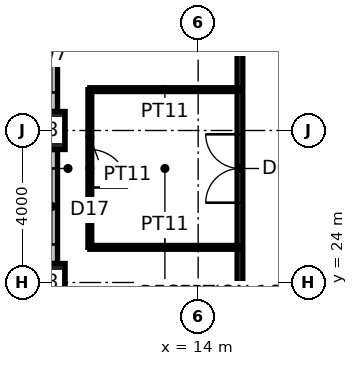
"""IFC4 building model, lengths in metres.
Left out: names, types, materials, properties, quantities, classifications, styles, units other than length and angle.
Written with IfcOpenShell. Run it as: python <this file> out.ifc"""

import sys

from ifc_helpers import new_model, si_unit, direction, frame, frame_2d, origin, origin_2d, place, context, subcontext, project, spatial, rectangle, hollow_rectangle, extrude, element, fill, save


model = new_model("IFC4")
c1 = context("Model", 3, precision=1e-05, world=origin(), true_north=direction((0.0, 1.0)))
c2 = subcontext(c1, "Body", "Model", "MODEL_VIEW")
j1 = project(units=[si_unit("LENGTHUNIT", "METRE"), si_unit("PLANEANGLEUNIT", "RADIAN")], contexts=[c1])
p1 = place(None, origin())
s1 = spatial("IfcSite", under=j1, at=p1, CompositionType="ELEMENT")
p2 = place(p1, origin())
s2 = spatial("IfcBuilding", under=s1, at=p2, CompositionType="ELEMENT")
p3 = place(p2, frame((0.0, 0.0, 133.4)))
s3 = spatial("IfcBuildingStorey", under=s2, at=p3, CompositionType="ELEMENT", Elevation=133.4)
for number, where, z_axis, x_axis in (
    (1, (10.0, 24.0, 0.0), (0.0, 0.0, 1.0), (1.0, 0.0, 0.0)),
    (2, (10.0, 28.0, 0.0), (0.0, 0.0, 1.0), (1.0, 0.0, 0.0)),
):
    element("IfcColumn", number, at=place(p3, frame(where, z_axis=z_axis, x_axis=x_axis)), inside=s3, PredefinedType="COLUMN", context=c2, shape_type="SweptSolid", body=[
        extrude(hollow_rectangle(XDim=1.0, YDim=1.0, WallThickness=0.125, at=origin_2d()), origin(), (0.0, 0.0, 1.0), 4.0),
    ])
p4 = place(p3, frame((15.1, 15.625, 0.0), z_axis=(0.0, 0.0, 1.0), x_axis=(0.0, 1.0, 0.0)))
e3 = element("IfcWall", 3, at=p4, inside=s3, PredefinedType="PARTITIONING", context=c2, shape_type="SweptSolid", body=[
    extrude(rectangle(XDim=22.75, YDim=0.15, at=frame_2d((11.375, 0.0))), origin(), (0.0, 0.0, 1.0), 3.85),
])
p5 = place(p4, frame((10.475, 0.0, 0.0)))
e4 = element("IfcOpeningElement", 4, at=p5, cuts=e3, PredefinedType="OPENING", context=c2, shape_type="SweptSolid", body=[
    extrude(rectangle(XDim=1.8, YDim=2.4, at=frame_2d((0.9, 1.2))), frame((0.0, 0.085, 0.0), z_axis=(0.0, -1.0, 0.0), x_axis=(1.0, 0.0, 0.0)), (0.0, 0.0, 1.0), 0.17),
])
p6 = place(p3, frame((15.1, 29.075, 0.0), z_axis=(0.0, 0.0, 1.0), x_axis=(-1.0, 0.0, 0.0)))
e5 = element("IfcWall", 5, at=p6, inside=s3, PredefinedType="PARTITIONING", context=c2, shape_type="SweptSolid", body=[
    extrude(rectangle(XDim=3.95, YDim=0.1, at=frame_2d((1.975, 0.0))), origin(), (0.0, 0.0, 1.0), 3.85),
])
p7 = place(p3, frame((11.15, 29.075, 0.0), z_axis=(0.0, 0.0, 1.0), x_axis=(0.0, -1.0, 0.0)))
e6 = element("IfcWall", 6, at=p7, inside=s3, PredefinedType="PARTITIONING", context=c2, shape_type="SweptSolid", body=[
    extrude(rectangle(XDim=4.15, YDim=0.1, at=frame_2d((2.075, 0.0))), origin(), (0.0, 0.0, 1.0), 3.85),
])
p8 = place(p7, frame((1.575, 0.0, 0.0)))
e7 = element("IfcOpeningElement", 7, at=p8, cuts=e6, PredefinedType="OPENING", context=c2, shape_type="SweptSolid", body=[
    extrude(rectangle(XDim=1.0, YDim=2.2, at=frame_2d((0.5, 1.1))), frame((0.0, 0.06, 0.0), z_axis=(0.0, -1.0, 0.0), x_axis=(1.0, 0.0, 0.0)), (0.0, 0.0, 1.0), 0.12),
])
p9 = place(p3, frame((11.15, 24.925, 0.0), z_axis=(0.0, 0.0, 1.0), x_axis=(1.0, 0.0, 0.0)))
e8 = element("IfcWall", 8, at=p9, inside=s3, PredefinedType="PARTITIONING", context=c2, shape_type="SweptSolid", body=[
    extrude(rectangle(XDim=3.95, YDim=0.1, at=frame_2d((1.975, 0.0))), origin(), (0.0, 0.0, 1.0), 3.85),
])
p10 = place(p3, frame((10.15, 27.5, 0.0), z_axis=(0.0, 0.0, 1.0), x_axis=(0.0, -1.0, 0.0)))
e9 = element("IfcWall", 9, at=p10, inside=s3, PredefinedType="ELEMENTEDWALL", context=c2, shape_type="SweptSolid", body=[
    extrude(rectangle(XDim=3.0, YDim=0.3, at=frame_2d((1.5, 0.0))), origin(), (0.0, 0.0, 1.0), 2.65),
])
p11 = place(p10, frame((0.5, 0.0, 0.8)))
e10 = element("IfcOpeningElement", 10, at=p11, cuts=e9, PredefinedType="OPENING", context=c2, shape_type="SweptSolid", body=[
    extrude(rectangle(XDim=2.0, YDim=1.8, at=frame_2d((1.0, 0.9))), frame((0.0, 0.16, 0.0), z_axis=(0.0, -1.0, 0.0), x_axis=(1.0, 0.0, 0.0)), (0.0, 0.0, 1.0), 0.32),
])
p12 = place(p3, frame((10.15, 31.5, 0.0), z_axis=(0.0, 0.0, 1.0), x_axis=(0.0, -1.0, 0.0)))
e11 = element("IfcWall", 11, at=p12, inside=s3, PredefinedType="ELEMENTEDWALL", context=c2, shape_type="SweptSolid", body=[
    extrude(rectangle(XDim=3.0, YDim=0.3, at=frame_2d((1.5, 0.0))), origin(), (0.0, 0.0, 1.0), 2.65),
])
p13 = place(p12, frame((0.5, 0.0, 0.8)))
e12 = element("IfcOpeningElement", 12, at=p13, cuts=e11, PredefinedType="OPENING", context=c2, shape_type="SweptSolid", body=[
    extrude(rectangle(XDim=2.0, YDim=1.8, at=frame_2d((1.0, 0.9))), frame((0.0, 0.16, 0.0), z_axis=(0.0, -1.0, 0.0), x_axis=(1.0, 0.0, 0.0)), (0.0, 0.0, 1.0), 0.32),
])
p14 = place(p5, origin())
e13 = element("IfcDoor", 13, at=p14, inside=s3, OperationType="DOUBLE_DOOR_DOUBLE_SWING", PredefinedType="DOOR", context=c2, shape_type="SweptSolid", body=[
    extrude(rectangle(XDim=1.8, YDim=2.4, at=frame_2d((0.9, 1.2))), frame((0.0, 0.025, 0.0), z_axis=(0.0, -1.0, 0.0), x_axis=(1.0, 0.0, 0.0)), (0.0, 0.0, 1.0), 0.05),
])
fill(e4, e13)
p15 = place(p8, origin())
e14 = element("IfcDoor", 14, at=p15, inside=s3, OperationType="SINGLE_SWING_RIGHT", PredefinedType="DOOR", context=c2, shape_type="SweptSolid", body=[
    extrude(rectangle(XDim=1.0, YDim=2.2, at=frame_2d((0.5, 1.1))), frame((0.0, 0.025, 0.0), z_axis=(0.0, -1.0, 0.0), x_axis=(1.0, 0.0, 0.0)), (0.0, 0.0, 1.0), 0.05),
])
fill(e7, e14)
p16 = place(p11, origin())
e15 = element("IfcWindow", 15, at=p16, inside=s3, PartitioningType="SINGLE_PANEL", PredefinedType="WINDOW", context=c2, shape_type="SweptSolid", body=[
    extrude(rectangle(XDim=2.0, YDim=1.8, at=frame_2d((1.0, 0.9))), frame((0.0, 0.03, 0.0), z_axis=(0.0, -1.0, 0.0), x_axis=(1.0, 0.0, 0.0)), (0.0, 0.0, 1.0), 0.06),
])
fill(e10, e15)
p17 = place(p13, origin())
e16 = element("IfcWindow", 16, at=p17, inside=s3, PartitioningType="SINGLE_PANEL", PredefinedType="WINDOW", context=c2, shape_type="SweptSolid", body=[
    extrude(rectangle(XDim=2.0, YDim=1.8, at=frame_2d((1.0, 0.9))), frame((0.0, 0.03, 0.0), z_axis=(0.0, -1.0, 0.0), x_axis=(1.0, 0.0, 0.0)), (0.0, 0.0, 1.0), 0.06),
])
fill(e12, e16)
save(model, sys.argv[1])
